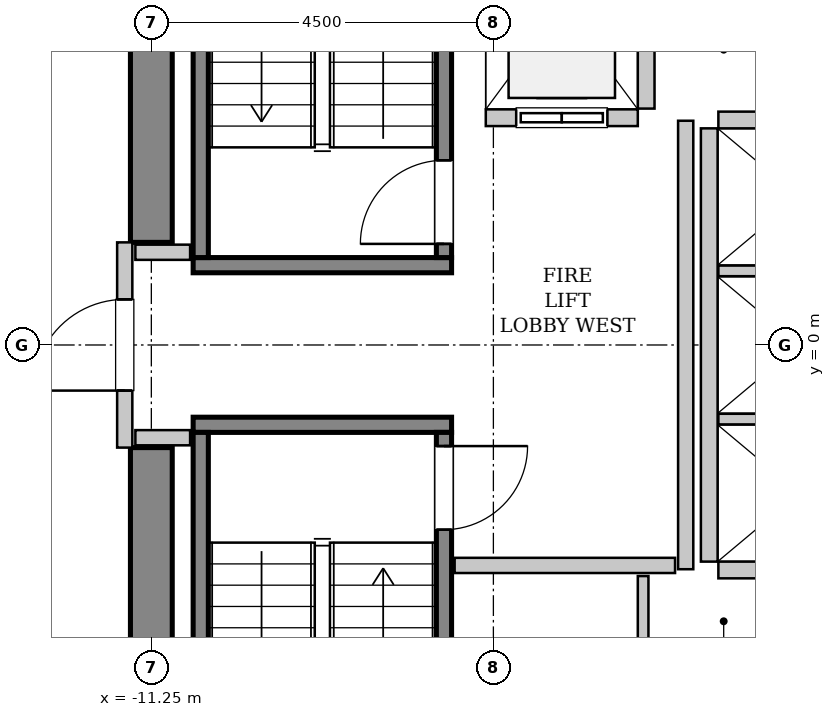
"""IFC4 building model, lengths in metres.
Left out: names, types, materials, properties, quantities, classifications, styles, units other than length and angle.
Written with IfcOpenShell. Run it as: python <this file> out.ifc"""

import sys

from ifc_helpers import new_model, si_unit, direction, frame, frame_2d, origin, place, context, subcontext, project, spatial, rectangle, extrude, source, transform, mapped, element, fill, save


model = new_model("IFC4")
c1 = context("Model", 3, precision=1e-05, world=origin(), true_north=direction((0.0, 1.0)))
c2 = subcontext(c1, "Body", "Model", "MODEL_VIEW")
j1 = project(units=[si_unit("LENGTHUNIT", "METRE"), si_unit("PLANEANGLEUNIT", "RADIAN")], contexts=[c1])
p1 = place(None, origin())
s1 = spatial("IfcSite", under=j1, at=p1, CompositionType="ELEMENT")
p2 = place(p1, origin())
s2 = spatial("IfcBuilding", under=s1, at=p2, CompositionType="ELEMENT")
p3 = place(p2, frame((0.0, 0.0, 183.0)))
s3 = spatial("IfcBuildingStorey", under=s2, at=p3, CompositionType="ELEMENT", Elevation=183.0)
m1 = source(origin(), c2, "Body", "SweptSolid", [
    extrude(rectangle(XDim=7.375, YDim=0.55, at=frame_2d((3.688, 0.0))), origin(), (0.0, 0.0, 1.0), 3.8),
])
for number, where, z_axis, x_axis in (
    (1, (-11.25, -8.725, 0.0), (0.0, 0.0, 1.0), (0.0, 1.0, 0.0)),
    (2, (-11.25, 1.35, 0.0), (0.0, 0.0, 1.0), (0.0, 1.0, 0.0)),
):
    element("IfcWall", number, at=place(p3, frame(where, z_axis=z_axis, x_axis=x_axis)), inside=s3, PredefinedType="SHEAR", context=c2, shape_type="MappedRepresentation", body=[
        mapped(m1, transform((0.0, 0.0, 0.0), x_axis=(1.0, 0.0, 0.0), y_axis=(0.0, 1.0, 0.0), z_axis=(0.0, 0.0, 1.0), scale=1.0)),
    ])
m2 = source(origin(), c2, "Body", "SweptSolid", [
    extrude(rectangle(XDim=3.4, YDim=0.2, at=frame_2d((1.7, 0.0))), origin(), (0.0, 0.0, 1.0), 3.8),
])
p4 = place(p3, frame((-7.3, 1.05, 0.0), z_axis=(0.0, 0.0, 1.0), x_axis=(-1.0, 0.0, 0.0)))
e3 = element("IfcWall", 3, at=p4, inside=s3, PredefinedType="SOLIDWALL", context=c2, shape_type="MappedRepresentation", body=[
    mapped(m2, transform((0.0, 0.0, 0.0), x_axis=(1.0, 0.0, 0.0), y_axis=(0.0, 1.0, 0.0), z_axis=(0.0, 0.0, 1.0), scale=1.0)),
])
m3 = source(origin(), c2, "Body", "SweptSolid", [
    extrude(rectangle(XDim=7.1, YDim=0.2, at=frame_2d((3.55, 0.0))), origin(), (0.0, 0.0, 1.0), 3.8),
])
p5 = place(p3, frame((-7.4, 1.15, 0.0), z_axis=(0.0, 0.0, 1.0), x_axis=(0.0, 1.0, 0.0)))
e4 = element("IfcWall", 4, at=p5, inside=s3, PredefinedType="SOLIDWALL", context=c2, shape_type="MappedRepresentation", body=[
    mapped(m3, transform((0.0, 0.0, 0.0), x_axis=(1.0, 0.0, 0.0), y_axis=(0.0, 1.0, 0.0), z_axis=(0.0, 0.0, 1.0), scale=1.0)),
])
p6 = place(p5, frame((0.18, 0.0, 0.0)))
e5 = element("IfcOpeningElement", 5, at=p6, cuts=e4, PredefinedType="OPENING", context=c2, shape_type="SweptSolid", body=[
    extrude(rectangle(XDim=1.1, YDim=2.15, at=frame_2d((0.55, 1.075))), frame((0.0, 0.11, 0.0), z_axis=(0.0, -1.0, 0.0), x_axis=(1.0, 0.0, 0.0)), (0.0, 0.0, 1.0), 0.22),
])
p7 = place(p3, frame((-10.6, 1.15, 0.0), z_axis=(0.0, 0.0, 1.0), x_axis=(0.0, 1.0, 0.0)))
e6 = element("IfcWall", 6, at=p7, inside=s3, PredefinedType="SOLIDWALL", context=c2, shape_type="MappedRepresentation", body=[
    mapped(m3, transform((0.0, 0.0, 0.0), x_axis=(1.0, 0.0, 0.0), y_axis=(0.0, 1.0, 0.0), z_axis=(0.0, 0.0, 1.0), scale=1.0)),
])
p8 = place(p3, frame((-10.7, -1.05, 0.0), z_axis=(0.0, 0.0, 1.0), x_axis=(1.0, 0.0, 0.0)))
e7 = element("IfcWall", 7, at=p8, inside=s3, PredefinedType="SOLIDWALL", context=c2, shape_type="MappedRepresentation", body=[
    mapped(m2, transform((0.0, 0.0, 0.0), x_axis=(1.0, 0.0, 0.0), y_axis=(0.0, 1.0, 0.0), z_axis=(0.0, 0.0, 1.0), scale=1.0)),
])
p9 = place(p3, frame((-10.6, -1.15, 0.0), z_axis=(0.0, 0.0, 1.0), x_axis=(0.0, -1.0, 0.0)))
e8 = element("IfcWall", 8, at=p9, inside=s3, PredefinedType="SOLIDWALL", context=c2, shape_type="MappedRepresentation", body=[
    mapped(m3, transform((0.0, 0.0, 0.0), x_axis=(1.0, 0.0, 0.0), y_axis=(0.0, 1.0, 0.0), z_axis=(0.0, 0.0, 1.0), scale=1.0)),
])
p10 = place(p3, frame((-7.4, -1.15, 0.0), z_axis=(0.0, 0.0, 1.0), x_axis=(0.0, -1.0, 0.0)))
e9 = element("IfcWall", 9, at=p10, inside=s3, PredefinedType="SOLIDWALL", context=c2, shape_type="MappedRepresentation", body=[
    mapped(m3, transform((0.0, 0.0, 0.0), x_axis=(1.0, 0.0, 0.0), y_axis=(0.0, 1.0, 0.0), z_axis=(0.0, 0.0, 1.0), scale=1.0)),
])
p11 = place(p10, frame((0.18, 0.0, 0.0)))
e10 = element("IfcOpeningElement", 10, at=p11, cuts=e9, PredefinedType="OPENING", context=c2, shape_type="SweptSolid", body=[
    extrude(rectangle(XDim=1.1, YDim=2.15, at=frame_2d((0.55, 1.075))), frame((0.0, 0.11, 0.0), z_axis=(0.0, -1.0, 0.0), x_axis=(1.0, 0.0, 0.0)), (0.0, 0.0, 1.0), 0.22),
])
m4 = source(origin(), c2, "Body", "SweptSolid", [
    extrude(rectangle(XDim=2.0, YDim=0.22, at=frame_2d((1.0, 0.0))), origin(), (0.0, 0.0, 1.0), 3.535),
])
p12 = place(p3, frame((-6.85, 2.99, 0.0), z_axis=(0.0, 0.0, 1.0), x_axis=(1.0, 0.0, 0.0)))
e11 = element("IfcWall", 11, at=p12, inside=s3, PredefinedType="SOLIDWALL", context=c2, shape_type="MappedRepresentation", body=[
    mapped(m4, transform((0.0, 0.0, 0.0), x_axis=(1.0, 0.0, 0.0), y_axis=(0.0, 1.0, 0.0), z_axis=(0.0, 0.0, 1.0), scale=1.0)),
])
p13 = place(p12, frame((0.4, 0.0, 0.0)))
e12 = element("IfcOpeningElement", 12, at=p13, cuts=e11, PredefinedType="OPENING", context=c2, shape_type="SweptSolid", body=[
    extrude(rectangle(XDim=1.2, YDim=2.2, at=frame_2d((0.6, 1.1))), frame((0.0, 0.12, 0.0), z_axis=(0.0, -1.0, 0.0), x_axis=(1.0, 0.0, 0.0)), (0.0, 0.0, 1.0), 0.24),
])
m5 = source(origin(), c2, "Body", "SweptSolid", [
    extrude(rectangle(XDim=2.68, YDim=0.22, at=frame_2d((1.34, 0.0))), origin(), (0.0, 0.0, 1.0), 3.535),
])
p14 = place(p3, frame((-4.74, 3.11, 0.0), z_axis=(0.0, 0.0, 1.0), x_axis=(0.0, 1.0, 0.0)))
e13 = element("IfcWall", 13, at=p14, inside=s3, PredefinedType="SOLIDWALL", context=c2, shape_type="MappedRepresentation", body=[
    mapped(m5, transform((0.0, 0.0, 0.0), x_axis=(1.0, 0.0, 0.0), y_axis=(0.0, 1.0, 0.0), z_axis=(0.0, 0.0, 1.0), scale=1.0)),
])
m6 = source(origin(), c2, "Body", "SweptSolid", [
    extrude(rectangle(XDim=5.7, YDim=0.22, at=frame_2d((2.85, 0.0))), origin(), (0.0, 0.0, 1.0), 3.535),
])
p15 = place(p3, frame((-3.91, 2.85, 0.0), z_axis=(0.0, 0.0, 1.0), x_axis=(0.0, -1.0, 0.0)))
e14 = element("IfcWall", 14, at=p15, inside=s3, PredefinedType="SOLIDWALL", context=c2, shape_type="MappedRepresentation", body=[
    mapped(m6, transform((0.0, 0.0, 0.0), x_axis=(1.0, 0.0, 0.0), y_axis=(0.0, 1.0, 0.0), z_axis=(0.0, 0.0, 1.0), scale=1.0)),
])
m7 = source(origin(), c2, "Body", "SweptSolid", [
    extrude(rectangle(XDim=2.13, YDim=0.22, at=frame_2d((1.065, 0.0))), origin(), (0.0, 0.0, 1.0), 3.535),
])
p16 = place(p3, frame((-3.79, -2.96, 0.0), z_axis=(0.0, 0.0, 1.0), x_axis=(1.0, 0.0, 0.0)))
e15 = element("IfcWall", 15, at=p16, inside=s3, PredefinedType="SOLIDWALL", context=c2, shape_type="MappedRepresentation", body=[
    mapped(m7, transform((0.0, 0.0, 0.0), x_axis=(1.0, 0.0, 0.0), y_axis=(0.0, 1.0, 0.0), z_axis=(0.0, 0.0, 1.0), scale=1.0)),
])
m8 = source(origin(), c2, "Body", "SweptSolid", [
    extrude(rectangle(XDim=2.13, YDim=0.14, at=frame_2d((1.065, 0.0))), origin(), (0.0, 0.0, 1.0), 3.535),
])
for number, where, z_axis, x_axis in (
    (16, (-3.79, -0.975, 0.0), (0.0, 0.0, 1.0), (1.0, 0.0, 0.0)),
    (17, (-3.79, 0.975, 0.0), (0.0, 0.0, 1.0), (1.0, 0.0, 0.0)),
):
    element("IfcWall", number, at=place(p3, frame(where, z_axis=z_axis, x_axis=x_axis)), inside=s3, PredefinedType="PARTITIONING", context=c2, shape_type="MappedRepresentation", body=[
        mapped(m8, transform((0.0, 0.0, 0.0), x_axis=(1.0, 0.0, 0.0), y_axis=(0.0, 1.0, 0.0), z_axis=(0.0, 0.0, 1.0), scale=1.0)),
    ])
p17 = place(p3, frame((-1.66, 2.96, 0.0), z_axis=(0.0, 0.0, 1.0), x_axis=(-1.0, 0.0, 0.0)))
e18 = element("IfcWall", 18, at=p17, inside=s3, PredefinedType="SOLIDWALL", context=c2, shape_type="MappedRepresentation", body=[
    mapped(m7, transform((0.0, 0.0, 0.0), x_axis=(1.0, 0.0, 0.0), y_axis=(0.0, 1.0, 0.0), z_axis=(0.0, 0.0, 1.0), scale=1.0)),
])
m9 = source(origin(), c2, "Body", "SweptSolid", [
    extrude(rectangle(XDim=2.7, YDim=0.2, at=frame_2d((1.35, 0.0))), origin(), (0.0, 0.0, 1.0), 2.425),
])
p18 = place(p3, frame((-11.6, -1.35, 0.0), z_axis=(0.0, 0.0, 1.0), x_axis=(0.0, 1.0, 0.0)))
e19 = element("IfcWall", 19, at=p18, inside=s3, PredefinedType="PARTITIONING", context=c2, shape_type="MappedRepresentation", body=[
    mapped(m9, transform((0.0, 0.0, 0.0), x_axis=(1.0, 0.0, 0.0), y_axis=(0.0, 1.0, 0.0), z_axis=(0.0, 0.0, 1.0), scale=1.0)),
])
p19 = place(p18, frame((0.75, 0.0, 0.0)))
e20 = element("IfcOpeningElement", 20, at=p19, cuts=e19, PredefinedType="OPENING", context=c2, shape_type="SweptSolid", body=[
    extrude(rectangle(XDim=1.2, YDim=2.15, at=frame_2d((0.6, 1.075))), frame((0.0, 0.11, 0.0), z_axis=(0.0, -1.0, 0.0), x_axis=(1.0, 0.0, 0.0)), (0.0, 0.0, 1.0), 0.22),
])
m10 = source(origin(), c2, "Body", "SweptSolid", [
    extrude(rectangle(XDim=5.9, YDim=0.2, at=frame_2d((2.95, 0.0))), origin(), (0.0, 0.0, 1.0), 3.535),
])
p20 = place(p3, frame((-4.22, -2.95, 0.0), z_axis=(0.0, 0.0, 1.0), x_axis=(0.0, 1.0, 0.0)))
e21 = element("IfcWall", 21, at=p20, inside=s3, PredefinedType="PARTITIONING", context=c2, shape_type="MappedRepresentation", body=[
    mapped(m10, transform((0.0, 0.0, 0.0), x_axis=(1.0, 0.0, 0.0), y_axis=(0.0, 1.0, 0.0), z_axis=(0.0, 0.0, 1.0), scale=1.0)),
])
m11 = source(origin(), c2, "Body", "SweptSolid", [
    extrude(rectangle(XDim=2.9, YDim=0.2, at=frame_2d((1.45, 0.0))), origin(), (0.0, 0.0, 1.0), 3.535),
])
p21 = place(p3, frame((-7.26, -2.9, 0.0), z_axis=(0.0, 0.0, 1.0), x_axis=(1.0, 0.0, 0.0)))
e22 = element("IfcWall", 22, at=p21, inside=s3, PredefinedType="PARTITIONING", context=c2, shape_type="MappedRepresentation", body=[
    mapped(m11, transform((0.0, 0.0, 0.0), x_axis=(1.0, 0.0, 0.0), y_axis=(0.0, 1.0, 0.0), z_axis=(0.0, 0.0, 1.0), scale=1.0)),
])
m12 = source(origin(), c2, "Body", "SweptSolid", [
    extrude(rectangle(XDim=0.72, YDim=0.2, at=frame_2d((0.36, 0.0))), origin(), (0.0, 0.0, 1.0), 3.535),
])
for number, where, z_axis, x_axis in (
    (23, (-11.46, 1.22, 0.0), (0.0, 0.0, 1.0), (1.0, 0.0, 0.0)),
    (24, (-11.46, -1.22, 0.0), (0.0, 0.0, 1.0), (1.0, 0.0, 0.0)),
):
    element("IfcWall", number, at=place(p3, frame(where, z_axis=z_axis, x_axis=x_axis)), inside=s3, PredefinedType="PARTITIONING", context=c2, shape_type="MappedRepresentation", body=[
        mapped(m12, transform((0.0, 0.0, 0.0), x_axis=(1.0, 0.0, 0.0), y_axis=(0.0, 1.0, 0.0), z_axis=(0.0, 0.0, 1.0), scale=1.0)),
    ])
m13 = source(origin(), c2, "Body", "SweptSolid", [
    extrude(rectangle(XDim=1.1, YDim=0.14, at=frame_2d((0.55, 0.0))), origin(), (0.0, 0.0, 1.0), 3.535),
])
p22 = place(p3, frame((-4.78, -4.14, 0.0), z_axis=(0.0, 0.0, 1.0), x_axis=(0.0, 1.0, 0.0)))
e25 = element("IfcWall", 25, at=p22, inside=s3, PredefinedType="PARTITIONING", context=c2, shape_type="MappedRepresentation", body=[
    mapped(m13, transform((0.0, 0.0, 0.0), x_axis=(1.0, 0.0, 0.0), y_axis=(0.0, 1.0, 0.0), z_axis=(0.0, 0.0, 1.0), scale=1.0)),
])
m14 = source(origin(), c2, "Body", "SweptSolid", [
    extrude(rectangle(XDim=1.1, YDim=2.15, at=frame_2d((0.55, 1.075))), frame((0.0, 0.025, 0.0), z_axis=(0.0, -1.0, 0.0), x_axis=(1.0, 0.0, 0.0)), (0.0, 0.0, 1.0), 0.05),
])
p23 = place(p6, origin())
e26 = element("IfcDoor", 26, at=p23, inside=s3, OperationType="SINGLE_SWING_LEFT", PredefinedType="DOOR", context=c2, shape_type="MappedRepresentation", body=[
    mapped(m14, transform((0.0, 0.0, 0.0), x_axis=(1.0, 0.0, 0.0), y_axis=(0.0, 1.0, 0.0), z_axis=(0.0, 0.0, 1.0), scale=1.0)),
])
fill(e5, e26)
p24 = place(p11, origin())
e27 = element("IfcDoor", 27, at=p24, inside=s3, OperationType="SINGLE_SWING_LEFT", PredefinedType="DOOR", context=c2, shape_type="MappedRepresentation", body=[
    mapped(m14, transform((0.0, 0.0, 0.0), x_axis=(1.0, 0.0, 0.0), y_axis=(0.0, 1.0, 0.0), z_axis=(0.0, 0.0, 1.0), scale=1.0)),
])
fill(e10, e27)
m15 = source(origin(), c2, "Body", "SweptSolid", [
    extrude(rectangle(XDim=1.2, YDim=2.2, at=frame_2d((0.6, 1.1))), frame((0.0, 0.025, 0.0), z_axis=(0.0, -1.0, 0.0), x_axis=(1.0, 0.0, 0.0)), (0.0, 0.0, 1.0), 0.05),
])
p25 = place(p13, origin())
e28 = element("IfcDoor", 28, at=p25, inside=s3, OperationType="SLIDING_TO_LEFT", PredefinedType="DOOR", context=c2, shape_type="MappedRepresentation", body=[
    mapped(m15, transform((0.0, 0.0, 0.0), x_axis=(1.0, 0.0, 0.0), y_axis=(0.0, 1.0, 0.0), z_axis=(0.0, 0.0, 1.0), scale=1.0)),
])
fill(e12, e28)
m16 = source(origin(), c2, "Body", "SweptSolid", [
    extrude(rectangle(XDim=1.2, YDim=2.15, at=frame_2d((0.6, 1.075))), frame((0.0, 0.025, 0.0), z_axis=(0.0, -1.0, 0.0), x_axis=(1.0, 0.0, 0.0)), (0.0, 0.0, 1.0), 0.05),
])
p26 = place(p19, origin())
e29 = element("IfcDoor", 29, at=p26, inside=s3, OperationType="SINGLE_SWING_LEFT", PredefinedType="DOOR", context=c2, shape_type="MappedRepresentation", body=[
    mapped(m16, transform((0.0, 0.0, 0.0), x_axis=(1.0, 0.0, 0.0), y_axis=(0.0, 1.0, 0.0), z_axis=(0.0, 0.0, 1.0), scale=1.0)),
])
fill(e20, e29)
save(model, sys.argv[1])
